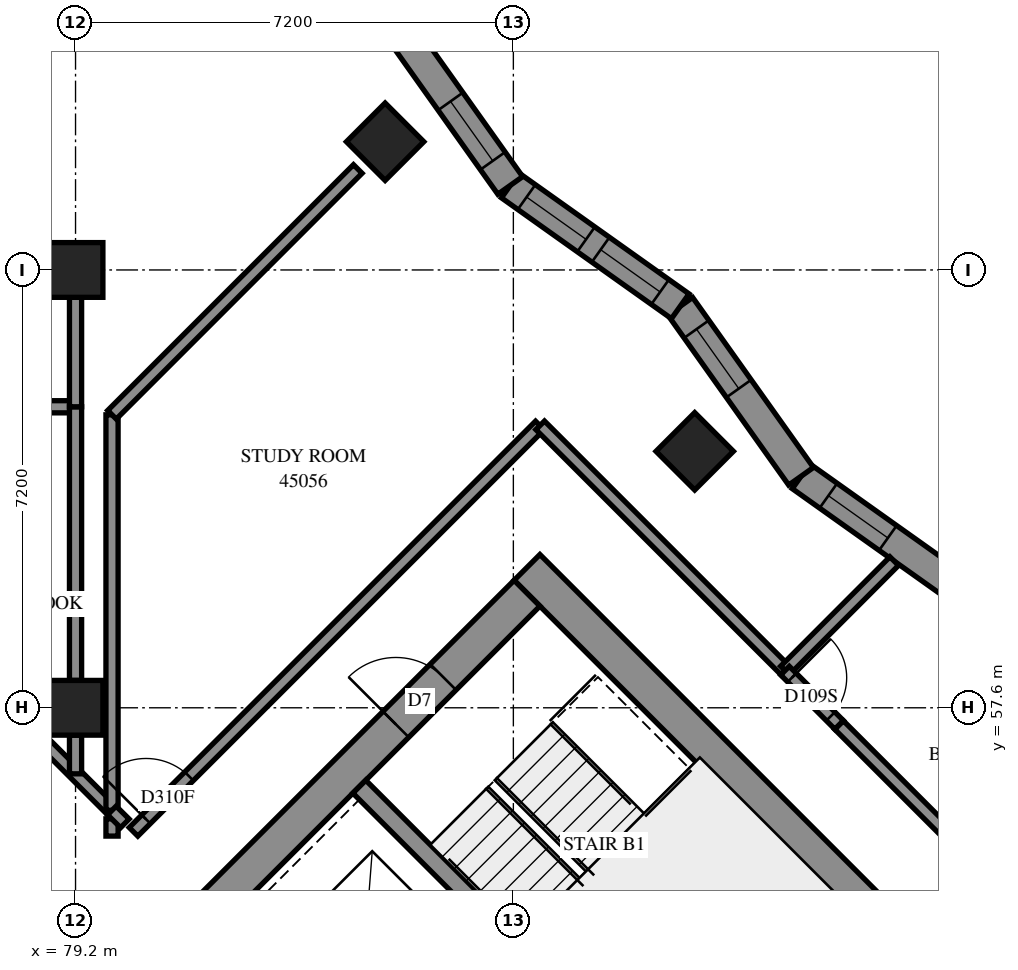
"""IFC4 building model, lengths in metres.
Left out: names, types, materials, properties, quantities, classifications, styles, units other than length and angle.
Written with IfcOpenShell. Run it as: python <this file> out.ifc"""

import sys

from ifc_helpers import new_model, si_unit, direction, frame, frame_2d, origin, origin_2d, place, context, subcontext, project, spatial, polyline, rectangle, outline, extrude, element, fill, save


model = new_model("IFC4")
c1 = context("Model", 3, precision=1e-05, world=origin(), true_north=direction((0.0, 1.0)))
c2 = subcontext(c1, "Body", "Model", "MODEL_VIEW")
j1 = project(units=[si_unit("LENGTHUNIT", "METRE"), si_unit("PLANEANGLEUNIT", "RADIAN")], contexts=[c1])
p1 = place(None, origin())
s1 = spatial("IfcSite", under=j1, at=p1, CompositionType="ELEMENT")
p2 = place(p1, origin())
s2 = spatial("IfcBuilding", under=s1, at=p2, CompositionType="ELEMENT")
p3 = place(p2, frame((0.0, 0.0, 166.0)))
s3 = spatial("IfcBuildingStorey", under=s2, at=p3, CompositionType="ELEMENT", Elevation=166.0)
for number, where, z_axis, x_axis in (
    (1, (79.2, 57.6, 0.0), (0.0, 0.0, 1.0), (1.0, 0.0, 0.0)),
    (2, (79.2, 64.8, 0.0), (0.0, 0.0, 1.0), (1.0, 0.0, 0.0)),
    (3, (84.291, 66.909, 0.0), (0.0, 0.0, 1.0), (0.707, -0.707, 0.0)),
    (4, (89.382, 61.818, 0.0), (0.0, 0.0, 1.0), (0.707, -0.707, 0.0)),
):
    element("IfcColumn", number, at=place(p3, frame(where, z_axis=z_axis, x_axis=x_axis)), inside=s3, PredefinedType="COLUMN", context=c2, shape_type="SweptSolid", body=[
        extrude(rectangle(XDim=0.9, YDim=0.9, at=origin_2d()), origin(), (0.0, 0.0, 1.0), 3.1),
    ])
p4 = place(p3, frame((86.625, 59.908, -0.3), z_axis=(0.0, 0.0, 1.0), x_axis=(0.7071067812, -0.7071067812, 0.0)))
e5 = element("IfcWall", 5, at=p4, inside=s3, PredefinedType="SHEAR", context=c2, shape_type="SweptSolid", body=[
    extrude(rectangle(XDim=15.6, YDim=0.6, at=frame_2d((7.8, 0.0))), origin(), (0.0, 0.0, 1.0), 2.7),
])
p5 = place(p4, frame((10.6, 0.0, 0.3)))
e6 = element("IfcOpeningElement", 6, at=p5, cuts=e5, PredefinedType="OPENING", context=c2, shape_type="SweptSolid", body=[
    extrude(rectangle(XDim=0.8, YDim=2.1, at=frame_2d((0.4, 1.05))), frame((0.0, 0.31, 0.0), z_axis=(0.0, -1.0, 0.0), x_axis=(1.0, 0.0, 0.0)), (0.0, 0.0, 1.0), 0.62),
])
p6 = place(p3, frame((76.442, 49.302, -0.3), z_axis=(0.0, 0.0, 1.0), x_axis=(0.7071067812, 0.7071067812, 0.0)))
e7 = element("IfcWall", 7, at=p6, inside=s3, PredefinedType="SHEAR", context=c2, shape_type="SweptSolid", body=[
    extrude(rectangle(XDim=14.4, YDim=0.6, at=frame_2d((7.2, 0.0))), origin(), (0.0, 0.0, 1.0), 2.7),
])
p7 = place(p6, frame((4.55, 0.0, 0.3)))
e8 = element("IfcOpeningElement", 8, at=p7, cuts=e7, PredefinedType="OPENING", context=c2, shape_type="SweptSolid", body=[
    extrude(rectangle(XDim=1.1, YDim=2.1, at=frame_2d((0.55, 1.05))), frame((0.0, 0.31, 0.0), z_axis=(0.0, -1.0, 0.0), x_axis=(1.0, 0.0, 0.0)), (0.0, 0.0, 1.0), 0.62),
])
p8 = place(p6, frame((11.35, 0.0, 0.3)))
e9 = element("IfcOpeningElement", 9, at=p8, cuts=e7, PredefinedType="OPENING", context=c2, shape_type="SweptSolid", body=[
    extrude(rectangle(XDim=1.1, YDim=2.1, at=frame_2d((0.55, 1.05))), frame((0.0, 0.31, 0.0), z_axis=(0.0, -1.0, 0.0), x_axis=(1.0, 0.0, 0.0)), (0.0, 0.0, 1.0), 0.62),
])
p9 = place(p3, frame((83.867, 56.302, 0.0), z_axis=(0.0, 0.0, 1.0), x_axis=(0.7071137256, -0.7070998367, 0.0)))
e10 = element("IfcWall", 10, at=p9, inside=s3, PredefinedType="SOLIDWALL", context=c2, shape_type="SweptSolid", body=[
    extrude(rectangle(XDim=7.2, YDim=0.3, at=frame_2d((3.6, 0.0))), origin(), (0.0, 0.0, 1.0), 3.1),
])
p10 = place(p3, frame((93.927, 59.42, 0.0), z_axis=(0.0, 0.0, 1.0), x_axis=(-0.8151376585, 0.5792672938, 0.0)))
e11 = element("IfcWall", 11, at=p10, inside=s3, PredefinedType="SOLIDWALL", context=c2, shape_type="SweptSolid", body=[
    extrude(outline(polyline([(-0.042, -0.25), (3.388, -0.25), (3.472, 0.25), (0.042, 0.25), (-0.042, -0.25)])), origin(), (0.0, 0.0, 1.0), 3.1),
])
p11 = place(p10, frame((1.679, 0.0, 0.45)))
e12 = element("IfcOpeningElement", 12, at=p11, cuts=e11, PredefinedType="OPENING", context=c2, shape_type="SweptSolid", body=[
    extrude(rectangle(XDim=1.2, YDim=2.5, at=frame_2d((0.6, 1.25))), frame((0.0, 0.26, 0.0), z_axis=(0.0, -1.0, 0.0), x_axis=(1.0, 0.0, 0.0)), (0.0, 0.0, 1.0), 0.52),
])
p12 = place(p3, frame((91.131, 61.407, 0.0), z_axis=(0.0, 0.0, 1.0), x_axis=(-0.5792728992, 0.8151336751, 0.0)))
e13 = element("IfcWall", 13, at=p12, inside=s3, PredefinedType="SOLIDWALL", context=c2, shape_type="SweptSolid", body=[
    extrude(outline(polyline([(0.042, -0.25), (3.472, -0.25), (3.388, 0.25), (-0.042, 0.25), (0.042, -0.25)])), origin(), (0.0, 0.0, 1.0), 3.1),
])
p13 = place(p12, frame((1.768, 0.0, 0.45)))
e14 = element("IfcOpeningElement", 14, at=p13, cuts=e13, PredefinedType="OPENING", context=c2, shape_type="SweptSolid", body=[
    extrude(rectangle(XDim=1.2, YDim=2.5, at=frame_2d((0.6, 1.25))), frame((0.0, 0.26, 0.0), z_axis=(0.0, -1.0, 0.0), x_axis=(1.0, 0.0, 0.0)), (0.0, 0.0, 1.0), 0.52),
])
p14 = place(p3, frame((89.144, 64.203, 0.0), z_axis=(0.0, 0.0, 1.0), x_axis=(-0.8151376585, 0.5792672938, 0.0)))
e15 = element("IfcWall", 15, at=p14, inside=s3, PredefinedType="SOLIDWALL", context=c2, shape_type="SweptSolid", body=[
    extrude(outline(polyline([(-0.042, -0.25), (3.388, -0.25), (3.472, 0.25), (0.042, 0.25), (-0.042, -0.25)])), origin(), (0.0, 0.0, 1.0), 3.1),
])
p15 = place(p14, frame((0.406, 0.0, 0.45)))
e16 = element("IfcOpeningElement", 16, at=p15, cuts=e15, PredefinedType="OPENING", context=c2, shape_type="SweptSolid", body=[
    extrude(rectangle(XDim=1.2, YDim=2.5, at=frame_2d((0.6, 1.25))), frame((0.0, 0.26, 0.0), z_axis=(0.0, -1.0, 0.0), x_axis=(1.0, 0.0, 0.0)), (0.0, 0.0, 1.0), 0.52),
])
p16 = place(p14, frame((1.9, 0.0, 0.45)))
e17 = element("IfcOpeningElement", 17, at=p16, cuts=e15, PredefinedType="OPENING", context=c2, shape_type="SweptSolid", body=[
    extrude(rectangle(XDim=1.2, YDim=2.5, at=frame_2d((0.6, 1.25))), frame((0.0, 0.26, 0.0), z_axis=(0.0, -1.0, 0.0), x_axis=(1.0, 0.0, 0.0)), (0.0, 0.0, 1.0), 0.52),
])
p17 = place(p3, frame((86.349, 66.19, 0.0), z_axis=(0.0, 0.0, 1.0), x_axis=(-0.5792728992, 0.8151336751, 0.0)))
e18 = element("IfcWall", 18, at=p17, inside=s3, PredefinedType="SOLIDWALL", context=c2, shape_type="SweptSolid", body=[
    extrude(outline(polyline([(0.042, -0.25), (3.472, -0.25), (3.388, 0.25), (-0.042, 0.25), (0.042, -0.25)])), origin(), (0.0, 0.0, 1.0), 3.1),
])
p18 = place(p17, frame((0.495, 0.0, 0.45)))
e19 = element("IfcOpeningElement", 19, at=p18, cuts=e18, PredefinedType="OPENING", context=c2, shape_type="SweptSolid", body=[
    extrude(rectangle(XDim=1.2, YDim=2.5, at=frame_2d((0.6, 1.25))), frame((0.0, 0.26, 0.0), z_axis=(0.0, -1.0, 0.0), x_axis=(1.0, 0.0, 0.0)), (0.0, 0.0, 1.0), 0.52),
])
p19 = place(p3, frame((91.755, 57.317, 0.0), z_axis=(0.0, 0.0, 1.0), x_axis=(0.7071067812, -0.7071067812, 0.0)))
e20 = element("IfcWall", 20, at=p19, inside=s3, PredefinedType="PARTITIONING", context=c2, shape_type="SweptSolid", body=[
    extrude(rectangle(XDim=11.639, YDim=0.2, at=frame_2d((5.819, 0.0))), origin(), (0.0, 0.0, 1.0), 3.1),
])
p20 = place(p3, frame((80.154, 55.56, 0.0), z_axis=(0.0, 0.0, 1.0), x_axis=(0.7071067812, 0.7071067812, 0.0)))
e21 = element("IfcWall", 21, at=p20, inside=s3, PredefinedType="PARTITIONING", context=c2, shape_type="SweptSolid", body=[
    extrude(rectangle(XDim=9.45, YDim=0.2, at=frame_2d((4.725, 0.0))), origin(), (0.0, 0.0, 1.0), 3.1),
])
p21 = place(p20, frame((0.292, 0.0, 0.0)))
e22 = element("IfcOpeningElement", 22, at=p21, cuts=e21, PredefinedType="OPENING", context=c2, shape_type="SweptSolid", body=[
    extrude(rectangle(XDim=1.0, YDim=2.1, at=frame_2d((0.5, 1.05))), frame((0.0, 0.11, 0.0), z_axis=(0.0, -1.0, 0.0), x_axis=(1.0, 0.0, 0.0)), (0.0, 0.0, 1.0), 0.22),
])
p22 = place(p3, frame((74.097, 61.611, 0.0), z_axis=(0.0, 0.0, 1.0), x_axis=(0.7071067812, -0.7071067812, 0.0)))
e23 = element("IfcWall", 23, at=p22, inside=s3, PredefinedType="PARTITIONING", context=c2, shape_type="SweptSolid", body=[
    extrude(rectangle(XDim=8.061, YDim=0.2, at=frame_2d((4.03, 0.0))), origin(), (0.0, 0.0, 1.0), 3.1),
])
p23 = place(p3, frame((79.8, 55.914, 0.0), z_axis=(0.0, 0.0, 1.0), x_axis=(0.0, 1.0, 0.0)))
e24 = element("IfcWall", 24, at=p23, inside=s3, PredefinedType="PARTITIONING", context=c2, shape_type="SweptSolid", body=[
    extrude(rectangle(XDim=6.504, YDim=0.2, at=frame_2d((3.252, 0.0))), origin(), (0.0, 0.0, 1.0), 3.1),
])
p24 = place(p3, frame((79.799, 62.419, 0.0), z_axis=(0.0, 0.0, 1.0), x_axis=(0.7071067812, 0.7071067812, 0.0)))
e25 = element("IfcWall", 25, at=p24, inside=s3, PredefinedType="PARTITIONING", context=c2, shape_type="SweptSolid", body=[
    extrude(rectangle(XDim=5.716, YDim=0.2, at=frame_2d((2.858, 0.0))), origin(), (0.0, 0.0, 1.0), 3.1),
])
p25 = place(p3, frame((86.841, 62.245, 0.0), z_axis=(0.0, 0.0, 1.0), x_axis=(0.7071067812, -0.7071067812, 0.0)))
e26 = element("IfcWall", 26, at=p25, inside=s3, PredefinedType="PARTITIONING", context=c2, shape_type="SweptSolid", body=[
    extrude(rectangle(XDim=5.699, YDim=0.2, at=frame_2d((2.85, 0.0))), origin(), (0.0, 0.0, 1.0), 3.1),
])
p26 = place(p3, frame((74.102, 62.55, 0.0), z_axis=(0.0, 0.0, 1.0), x_axis=(1.0, 0.0, 0.0)))
e27 = element("IfcWall", 27, at=p26, inside=s3, PredefinedType="PARTITIONING", context=c2, shape_type="SweptSolid", body=[
    extrude(rectangle(XDim=5.098, YDim=0.2, at=frame_2d((2.549, 0.0))), origin(), (0.0, 0.0, 1.0), 3.1),
])
p27 = place(p26, frame((1.319, 0.0, 0.0)))
e28 = element("IfcOpeningElement", 28, at=p27, cuts=e27, PredefinedType="OPENING", context=c2, shape_type="SweptSolid", body=[
    extrude(rectangle(XDim=1.0, YDim=2.1, at=frame_2d((0.5, 1.05))), frame((0.0, 0.11, 0.0), z_axis=(0.0, -1.0, 0.0), x_axis=(1.0, 0.0, 0.0)), (0.0, 0.0, 1.0), 0.22),
])
p28 = place(p3, frame((79.2, 58.05, 0.0), z_axis=(0.0, 0.0, 1.0), x_axis=(0.0, 1.0, 0.0)))
e29 = element("IfcWall", 29, at=p28, inside=s3, PredefinedType="PARTITIONING", context=c2, shape_type="SweptSolid", body=[
    extrude(rectangle(XDim=4.5, YDim=0.2, at=frame_2d((2.25, 0.0))), origin(), (0.0, 0.0, 1.0), 3.1),
])
p29 = place(p3, frame((90.867, 58.213, 0.0), z_axis=(0.0, 0.0, 1.0), x_axis=(0.7066148947, 0.7075983258, 0.0)))
e30 = element("IfcWall", 30, at=p29, inside=s3, PredefinedType="PARTITIONING", context=c2, shape_type="SweptSolid", body=[
    extrude(rectangle(XDim=2.542, YDim=0.2, at=frame_2d((1.271, 0.0))), origin(), (0.0, 0.0, 1.0), 3.1),
])
p30 = place(p3, frame((79.2, 62.55, 0.0), z_axis=(0.0, 0.0, 1.0), x_axis=(0.0, 1.0, 0.0)))
e31 = element("IfcWall", 31, at=p30, inside=s3, PredefinedType="PARTITIONING", context=c2, shape_type="SweptSolid", body=[
    extrude(rectangle(XDim=1.8, YDim=0.2, at=frame_2d((0.9, 0.0))), origin(), (0.0, 0.0, 1.0), 3.1),
])
p31 = place(p3, frame((90.867, 58.211, 0.0), z_axis=(0.0, 0.0, 1.0), x_axis=(0.706312726, -0.7078999456, 0.0)))
e32 = element("IfcWall", 32, at=p31, inside=s3, PredefinedType="PARTITIONING", context=c2, shape_type="SweptSolid", body=[
    extrude(rectangle(XDim=1.26, YDim=0.2, at=frame_2d((0.63, 0.0))), origin(), (0.0, 0.0, 1.0), 3.1),
])
p32 = place(p31, frame((0.162, 0.0, 0.0)))
e33 = element("IfcOpeningElement", 33, at=p32, cuts=e32, PredefinedType="OPENING", context=c2, shape_type="SweptSolid", body=[
    extrude(rectangle(XDim=0.9, YDim=2.1, at=frame_2d((0.45, 1.05))), frame((0.0, 0.11, 0.0), z_axis=(0.0, -1.0, 0.0), x_axis=(1.0, 0.0, 0.0)), (0.0, 0.0, 1.0), 0.22),
])
p33 = place(p3, frame((79.2, 56.514, 0.0), z_axis=(0.0, 0.0, 1.0), x_axis=(0.0, 1.0, 0.0)))
e34 = element("IfcWall", 34, at=p33, inside=s3, PredefinedType="PARTITIONING", context=c2, shape_type="SweptSolid", body=[
    extrude(rectangle(XDim=0.636, YDim=0.2, at=frame_2d((0.318, 0.0))), origin(), (0.0, 0.0, 1.0), 3.1),
])
p34 = place(p3, frame((79.8, 55.49, 0.0), z_axis=(0.0, 0.0, 1.0), x_axis=(0.0, 1.0, 0.0)))
e35 = element("IfcWall", 35, at=p34, inside=s3, PredefinedType="PARTITIONING", context=c2, shape_type="SweptSolid", body=[
    extrude(rectangle(XDim=0.284, YDim=0.2, at=frame_2d((0.142, 0.0))), origin(), (0.0, 0.0, 1.0), 3.1),
])
p35 = place(p3, frame((79.797, 55.911, 0.0), z_axis=(0.0, 0.0, 1.0), x_axis=(0.710418702, -0.7037792749, 0.0)))
e36 = element("IfcWall", 36, at=p35, inside=s3, PredefinedType="PARTITIONING", context=c2, shape_type="SweptSolid", body=[
    extrude(rectangle(XDim=0.301, YDim=0.2, at=frame_2d((0.151, 0.0))), origin(), (0.0, 0.0, 1.0), 3.1),
])
p36 = place(p11, origin())
e37 = element("IfcWindow", 37, at=p36, inside=s3, PartitioningType="SINGLE_PANEL", PredefinedType="WINDOW", context=c2, shape_type="SweptSolid", body=[
    extrude(rectangle(XDim=1.2, YDim=2.5, at=frame_2d((0.6, 1.25))), frame((0.0, 0.18, 0.0), z_axis=(0.0, -1.0, 0.0), x_axis=(1.0, 0.0, 0.0)), (0.0, 0.0, 1.0), 0.06),
])
fill(e12, e37)
p37 = place(p13, origin())
e38 = element("IfcWindow", 38, at=p37, inside=s3, PartitioningType="SINGLE_PANEL", PredefinedType="WINDOW", context=c2, shape_type="SweptSolid", body=[
    extrude(rectangle(XDim=1.2, YDim=2.5, at=frame_2d((0.6, 1.25))), frame((0.0, 0.18, 0.0), z_axis=(0.0, -1.0, 0.0), x_axis=(1.0, 0.0, 0.0)), (0.0, 0.0, 1.0), 0.06),
])
fill(e14, e38)
p38 = place(p15, origin())
e39 = element("IfcWindow", 39, at=p38, inside=s3, PartitioningType="SINGLE_PANEL", PredefinedType="WINDOW", context=c2, shape_type="SweptSolid", body=[
    extrude(rectangle(XDim=1.2, YDim=2.5, at=frame_2d((0.6, 1.25))), frame((0.0, 0.18, 0.0), z_axis=(0.0, -1.0, 0.0), x_axis=(1.0, 0.0, 0.0)), (0.0, 0.0, 1.0), 0.06),
])
fill(e16, e39)
p39 = place(p16, origin())
e40 = element("IfcWindow", 40, at=p39, inside=s3, PartitioningType="SINGLE_PANEL", PredefinedType="WINDOW", context=c2, shape_type="SweptSolid", body=[
    extrude(rectangle(XDim=1.2, YDim=2.5, at=frame_2d((0.6, 1.25))), frame((0.0, 0.18, 0.0), z_axis=(0.0, -1.0, 0.0), x_axis=(1.0, 0.0, 0.0)), (0.0, 0.0, 1.0), 0.06),
])
fill(e17, e40)
p40 = place(p18, origin())
e41 = element("IfcWindow", 41, at=p40, inside=s3, PartitioningType="SINGLE_PANEL", PredefinedType="WINDOW", context=c2, shape_type="SweptSolid", body=[
    extrude(rectangle(XDim=1.2, YDim=2.5, at=frame_2d((0.6, 1.25))), frame((0.0, 0.18, 0.0), z_axis=(0.0, -1.0, 0.0), x_axis=(1.0, 0.0, 0.0)), (0.0, 0.0, 1.0), 0.06),
])
fill(e19, e41)
p41 = place(p8, origin())
e42 = element("IfcDoor", 42, at=p41, inside=s3, OperationType="SINGLE_SWING_LEFT", PredefinedType="DOOR", context=c2, shape_type="SweptSolid", body=[
    extrude(rectangle(XDim=1.1, YDim=2.1, at=frame_2d((0.55, 1.05))), frame((0.0, 0.025, 0.0), z_axis=(0.0, -1.0, 0.0), x_axis=(1.0, 0.0, 0.0)), (0.0, 0.0, 1.0), 0.05),
])
fill(e9, e42)
p42 = place(p21, origin())
e43 = element("IfcDoor", 43, at=p42, inside=s3, OperationType="SINGLE_SWING_LEFT", PredefinedType="DOOR", context=c2, shape_type="SweptSolid", body=[
    extrude(rectangle(XDim=1.0, YDim=2.1, at=frame_2d((0.5, 1.05))), frame((0.0, 0.025, 0.0), z_axis=(0.0, -1.0, 0.0), x_axis=(1.0, 0.0, 0.0)), (0.0, 0.0, 1.0), 0.05),
])
fill(e22, e43)
p43 = place(p32, origin())
e44 = element("IfcDoor", 44, at=p43, inside=s3, OperationType="SINGLE_SWING_RIGHT", PredefinedType="DOOR", context=c2, shape_type="SweptSolid", body=[
    extrude(rectangle(XDim=0.9, YDim=2.1, at=frame_2d((0.45, 1.05))), frame((0.0, 0.025, 0.0), z_axis=(0.0, -1.0, 0.0), x_axis=(1.0, 0.0, 0.0)), (0.0, 0.0, 1.0), 0.05),
])
fill(e33, e44)
save(model, sys.argv[1])
